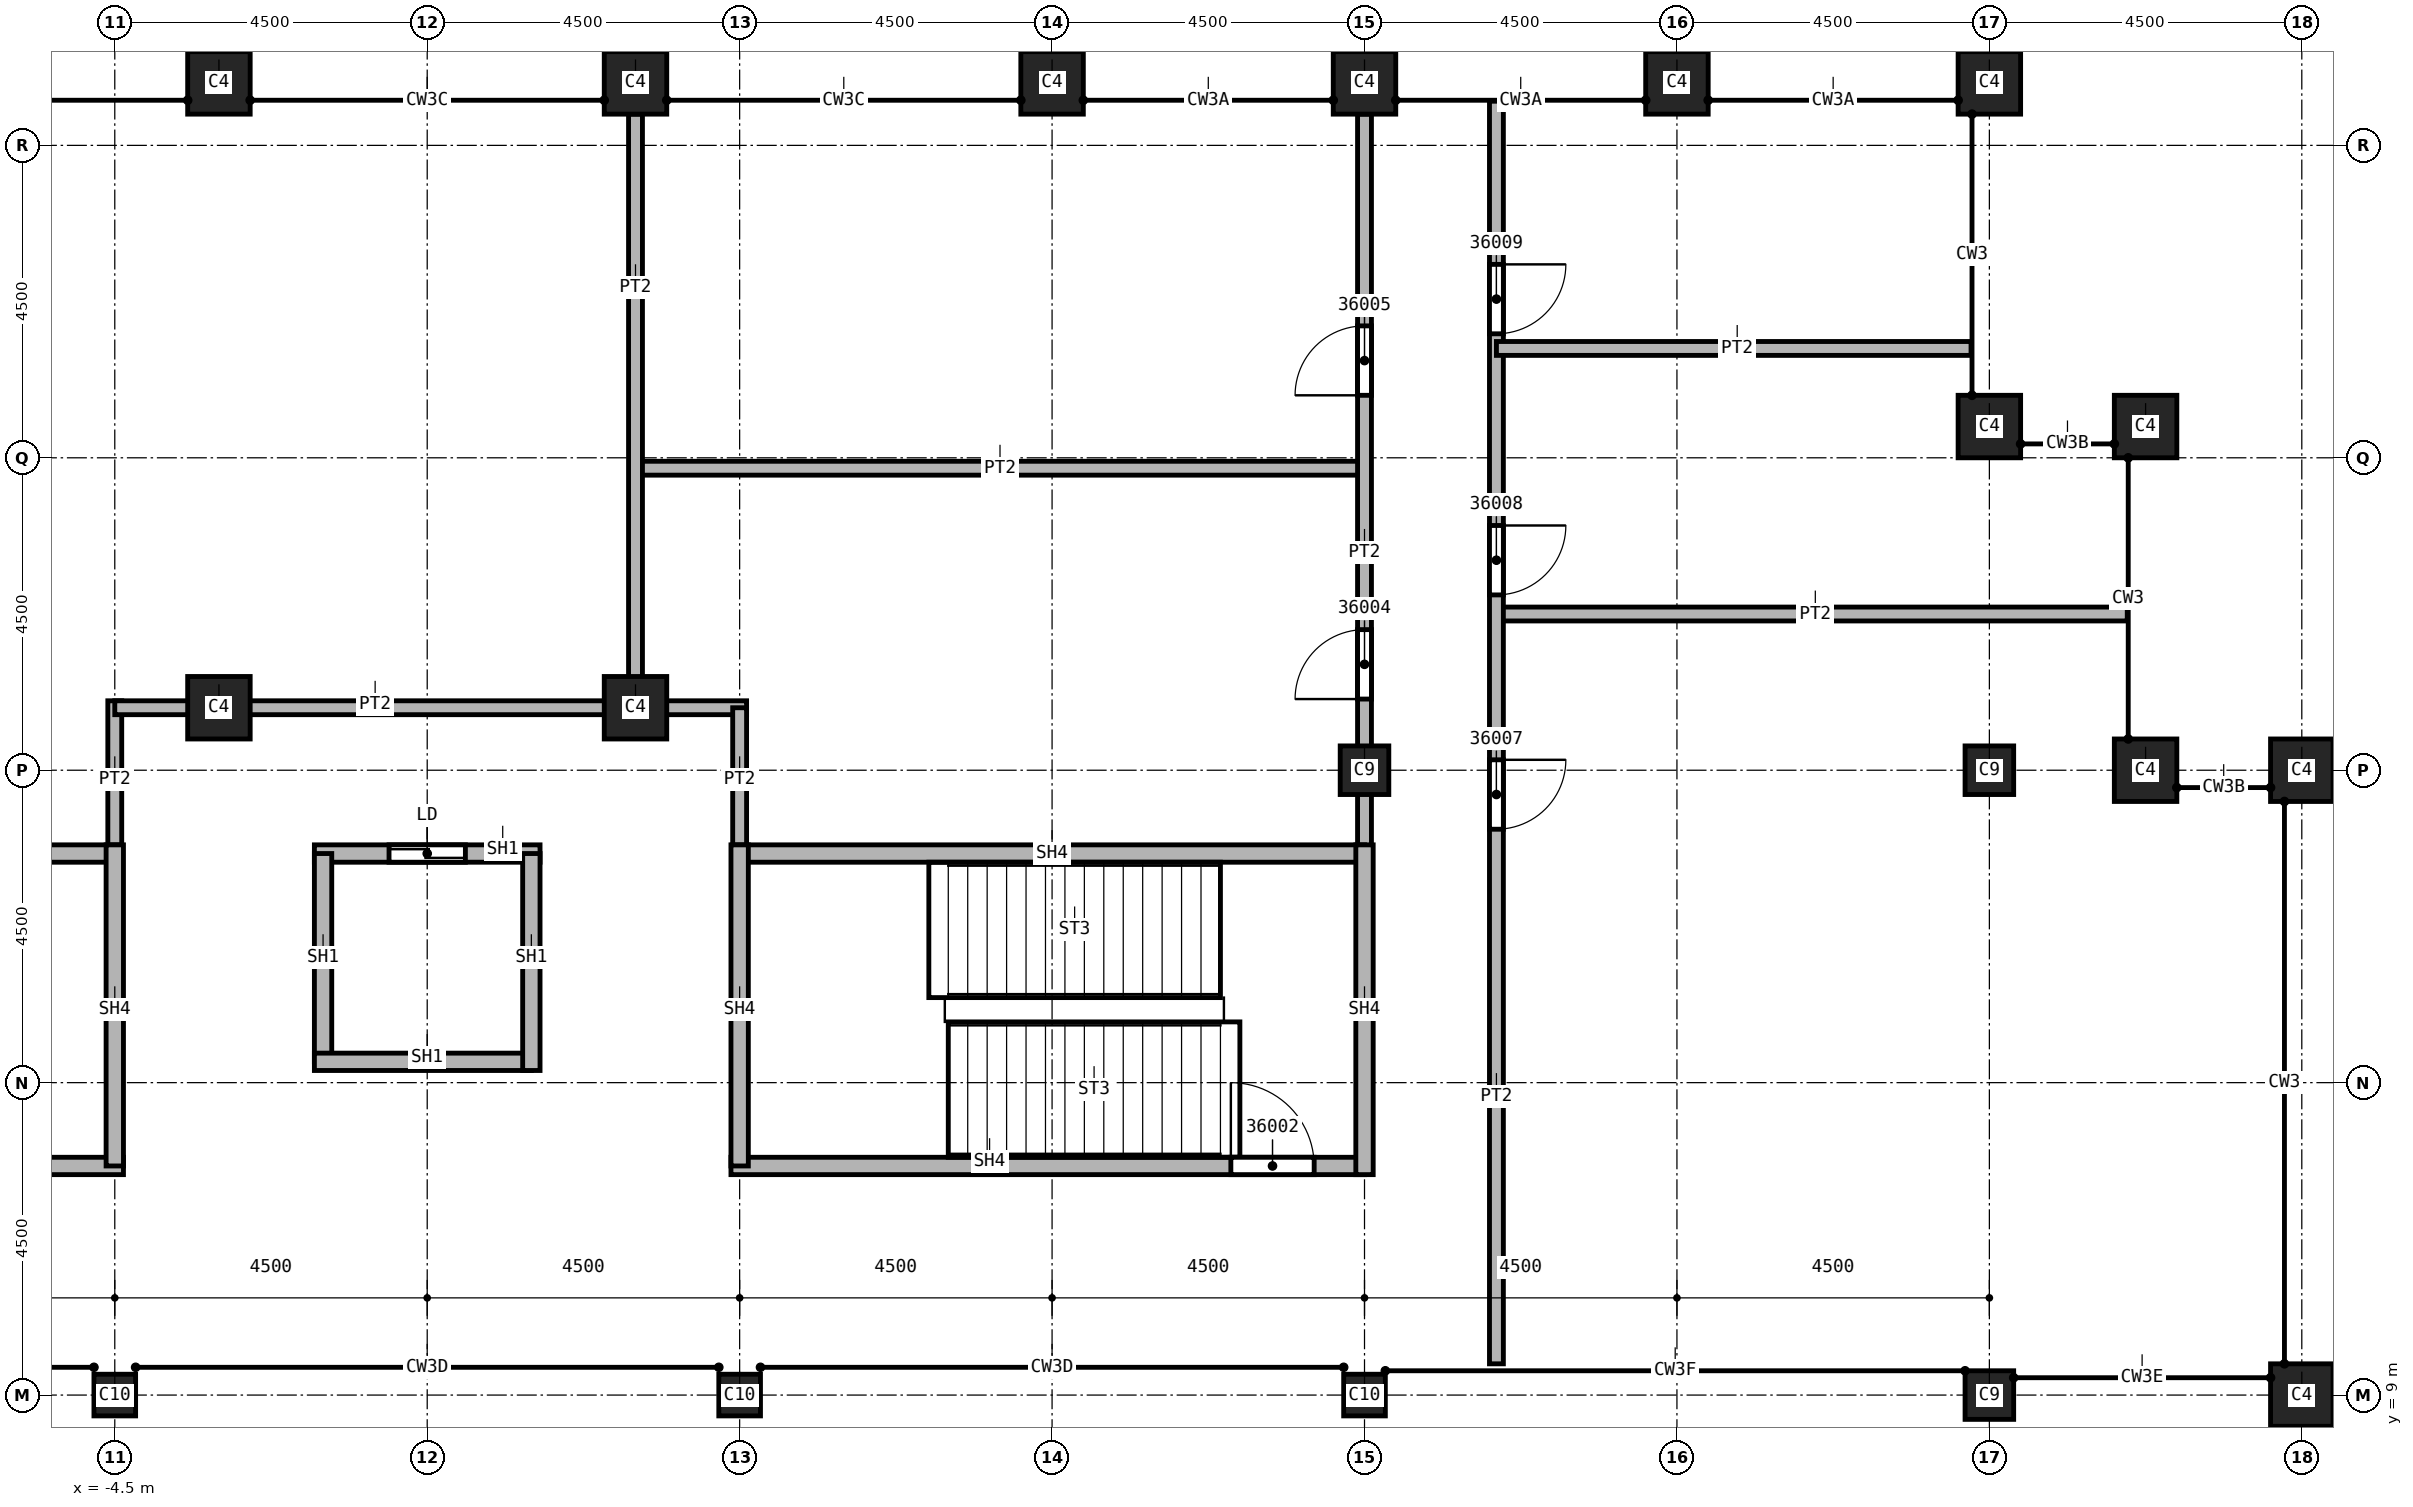
"""IFC4 building model, lengths in metres.
Left out: names, types, materials, properties, quantities, classifications, styles, units other than length and angle.
Written with IfcOpenShell. Run it as: python <this file> out.ifc"""

import sys

from ifc_helpers import new_model, si_unit, direction, frame, frame_2d, origin, origin_2d, place, context, subcontext, project, spatial, rectangle, extrude, element, fill, save


model = new_model("IFC4")
c1 = context("Model", 3, precision=1e-05, world=origin(), true_north=direction((0.0, 1.0)))
c2 = subcontext(c1, "Body", "Model", "MODEL_VIEW")
j1 = project(units=[si_unit("LENGTHUNIT", "METRE"), si_unit("PLANEANGLEUNIT", "RADIAN")], contexts=[c1])
p1 = place(None, origin())
s1 = spatial("IfcSite", under=j1, at=p1, CompositionType="ELEMENT")
p2 = place(p1, origin())
s2 = spatial("IfcBuilding", under=s1, at=p2, CompositionType="ELEMENT")
p3 = place(p2, frame((0.0, 0.0, 381.0)))
s3 = spatial("IfcBuildingStorey", under=s2, at=p3, CompositionType="ELEMENT", Elevation=381.0)
for number, where, z_axis, x_axis in (
    (1, (13.5, 18.0, 0.0), (0.0, 0.0, 1.0), (1.0, 0.0, 0.0)),
    (2, (22.5, 9.0, 0.0), (0.0, 0.0, 1.0), (1.0, 0.0, 0.0)),
    (3, (22.5, 18.0, 0.0), (0.0, 0.0, 1.0), (1.0, 0.0, 0.0)),
):
    element("IfcColumn", number, at=place(p3, frame(where, z_axis=z_axis, x_axis=x_axis)), inside=s3, PredefinedType="COLUMN", context=c2, shape_type="SweptSolid", body=[
        extrude(rectangle(XDim=0.7, YDim=0.7, at=origin_2d()), origin(), (0.0, 0.0, 1.0), 4.6),
    ])
for number, where, z_axis, x_axis in (
    (4, (4.5, 9.0, 0.0), (0.0, 0.0, 1.0), (1.0, 0.0, 0.0)),
    (5, (13.5, 9.0, 0.0), (0.0, 0.0, 1.0), (1.0, 0.0, 0.0)),
    (6, (-4.5, 9.0, 0.0), (0.0, 0.0, 1.0), (1.0, 0.0, 0.0)),
):
    element("IfcColumn", number, at=place(p3, frame(where, z_axis=z_axis, x_axis=x_axis)), inside=s3, PredefinedType="COLUMN", context=c2, shape_type="SweptSolid", body=[
        extrude(rectangle(XDim=0.6, YDim=0.6, at=origin_2d()), origin(), (0.0, 0.0, 1.0), 4.6),
    ])
for number, where, z_axis, x_axis in (
    (7, (27.0, 9.0, 0.0), (0.0, 0.0, 1.0), (0.0, 1.0, 0.0)),
    (8, (27.0, 18.0, 0.0), (0.0, 0.0, 1.0), (0.0, 1.0, 0.0)),
    (9, (3.0, 27.9, 0.0), (0.0, 0.0, 1.0), (1.0, 0.0, 0.0)),
    (10, (9.0, 27.9, 0.0), (0.0, 0.0, 1.0), (1.0, 0.0, 0.0)),
    (11, (13.5, 27.9, 0.0), (0.0, 0.0, 1.0), (1.0, 0.0, 0.0)),
    (12, (18.0, 27.9, 0.0), (0.0, 0.0, 1.0), (1.0, 0.0, 0.0)),
    (13, (22.5, 27.9, 0.0), (0.0, 0.0, 1.0), (1.0, 0.0, 0.0)),
    (14, (-3.0, 27.9, 0.0), (0.0, 0.0, 1.0), (1.0, 0.0, 0.0)),
    (15, (3.0, 18.9, 0.0), (0.0, 0.0, 1.0), (1.0, 0.0, 0.0)),
    (16, (-3.0, 18.9, 0.0), (0.0, 0.0, 1.0), (1.0, 0.0, 0.0)),
    (17, (22.5, 22.95, 0.0), (0.0, 0.0, 1.0), (1.0, 0.0, 0.0)),
    (18, (24.75, 22.95, 0.0), (0.0, 0.0, 1.0), (1.0, 0.0, 0.0)),
    (19, (24.75, 18.0, 0.0), (0.0, 0.0, 1.0), (1.0, 0.0, 0.0)),
):
    element("IfcColumn", number, at=place(p3, frame(where, z_axis=z_axis, x_axis=x_axis)), inside=s3, PredefinedType="COLUMN", context=c2, shape_type="SweptSolid", body=[
        extrude(rectangle(XDim=0.9, YDim=0.9, at=origin_2d()), origin(), (0.0, 0.0, 1.0), 4.6),
    ])
p4 = place(p3, frame((-4.5, 16.8, 0.0), z_axis=(0.0, 0.0, 1.0), x_axis=(0.0, 1.0, 0.0)))
e20 = element("IfcWall", 20, at=p4, inside=s3, PredefinedType="PARTITIONING", context=c2, shape_type="SweptSolid", body=[
    extrude(rectangle(XDim=2.2, YDim=0.2, at=frame_2d((1.1, 0.0))), origin(), (0.0, 0.0, 1.0), 4.15),
])
p5 = place(p3, frame((-4.5, 18.9, 0.0), z_axis=(0.0, 0.0, 1.0), x_axis=(1.0, 0.0, 0.0)))
e21 = element("IfcWall", 21, at=p5, inside=s3, PredefinedType="PARTITIONING", context=c2, shape_type="SweptSolid", body=[
    extrude(rectangle(XDim=9.1, YDim=0.2, at=frame_2d((4.55, 0.0))), origin(), (0.0, 0.0, 1.0), 4.15),
])
p6 = place(p3, frame((3.0, 22.35, 0.0), z_axis=(0.0, 0.0, 1.0), x_axis=(1.0, 0.0, 0.0)))
e22 = element("IfcWall", 22, at=p6, inside=s3, PredefinedType="PARTITIONING", context=c2, shape_type="SweptSolid", body=[
    extrude(rectangle(XDim=10.5, YDim=0.2, at=frame_2d((5.25, 0.0))), origin(), (0.0, 0.0, 1.0), 4.15),
])
p7 = place(p3, frame((3.0, 27.45, 0.0), z_axis=(0.0, 0.0, 1.0), x_axis=(0.0, -1.0, 0.0)))
e23 = element("IfcWall", 23, at=p7, inside=s3, PredefinedType="PARTITIONING", context=c2, shape_type="SweptSolid", body=[
    extrude(rectangle(XDim=8.55, YDim=0.2, at=frame_2d((4.275, 0.0))), origin(), (0.0, 0.0, 1.0), 4.15),
])
p8 = place(p3, frame((4.5, 18.9, 0.0), z_axis=(0.0, 0.0, 1.0), x_axis=(0.0, -1.0, 0.0)))
e24 = element("IfcWall", 24, at=p8, inside=s3, PredefinedType="PARTITIONING", context=c2, shape_type="SweptSolid", body=[
    extrude(rectangle(XDim=2.1, YDim=0.2, at=frame_2d((1.05, 0.0))), origin(), (0.0, 0.0, 1.0), 4.15),
])
p9 = place(p3, frame((13.5, 16.675, 0.0), z_axis=(0.0, 0.0, 1.0), x_axis=(0.0, 1.0, 0.0)))
e25 = element("IfcWall", 25, at=p9, inside=s3, PredefinedType="PARTITIONING", context=c2, shape_type="SweptSolid", body=[
    extrude(rectangle(XDim=10.775, YDim=0.2, at=frame_2d((5.387, 0.0))), origin(), (0.0, 0.0, 1.0), 4.15),
])
p10 = place(p9, frame((2.35, 0.0, 0.0)))
e26 = element("IfcOpeningElement", 26, at=p10, cuts=e25, PredefinedType="OPENING", context=c2, shape_type="SweptSolid", body=[
    extrude(rectangle(XDim=1.0, YDim=2.1, at=frame_2d((0.5, 1.05))), frame((0.0, 0.1, 0.0), z_axis=(0.0, -1.0, 0.0), x_axis=(1.0, 0.0, 0.0)), (0.0, 0.0, 1.0), 0.2),
])
p11 = place(p9, frame((6.725, 0.0, 0.0)))
e27 = element("IfcOpeningElement", 27, at=p11, cuts=e25, PredefinedType="OPENING", context=c2, shape_type="SweptSolid", body=[
    extrude(rectangle(XDim=1.0, YDim=2.1, at=frame_2d((0.5, 1.05))), frame((0.0, 0.1, 0.0), z_axis=(0.0, -1.0, 0.0), x_axis=(1.0, 0.0, 0.0)), (0.0, 0.0, 1.0), 0.2),
])
p12 = place(p3, frame((15.4, 20.25, 0.0), z_axis=(0.0, 0.0, 1.0), x_axis=(1.0, 0.0, 0.0)))
e28 = element("IfcWall", 28, at=p12, inside=s3, PredefinedType="PARTITIONING", context=c2, shape_type="SweptSolid", body=[
    extrude(rectangle(XDim=9.086, YDim=0.2, at=frame_2d((4.543, 0.0))), origin(), (0.0, 0.0, 1.0), 4.15),
])
p13 = place(p3, frame((15.4, 27.636, 0.0), z_axis=(0.0, 0.0, 1.0), x_axis=(0.0, -1.0, 0.0)))
e29 = element("IfcWall", 29, at=p13, inside=s3, PredefinedType="PARTITIONING", context=c2, shape_type="SweptSolid", body=[
    extrude(rectangle(XDim=18.186, YDim=0.2, at=frame_2d((9.093, 0.0))), origin(), (0.0, 0.0, 1.0), 4.15),
])
p14 = place(p13, frame((9.486, 0.0, 0.0)))
e30 = element("IfcOpeningElement", 30, at=p14, cuts=e29, PredefinedType="OPENING", context=c2, shape_type="SweptSolid", body=[
    extrude(rectangle(XDim=1.0, YDim=2.1, at=frame_2d((0.5, 1.05))), frame((0.0, 0.1, 0.0), z_axis=(0.0, -1.0, 0.0), x_axis=(1.0, 0.0, 0.0)), (0.0, 0.0, 1.0), 0.2),
])
p15 = place(p13, frame((6.111, 0.0, 0.0)))
e31 = element("IfcOpeningElement", 31, at=p15, cuts=e29, PredefinedType="OPENING", context=c2, shape_type="SweptSolid", body=[
    extrude(rectangle(XDim=1.0, YDim=2.1, at=frame_2d((0.5, 1.05))), frame((0.0, 0.1, 0.0), z_axis=(0.0, -1.0, 0.0), x_axis=(1.0, 0.0, 0.0)), (0.0, 0.0, 1.0), 0.2),
])
p16 = place(p13, frame((2.35, 0.0, 0.0)))
e32 = element("IfcOpeningElement", 32, at=p16, cuts=e29, PredefinedType="OPENING", context=c2, shape_type="SweptSolid", body=[
    extrude(rectangle(XDim=1.0, YDim=2.1, at=frame_2d((0.5, 1.05))), frame((0.0, 0.1, 0.0), z_axis=(0.0, -1.0, 0.0), x_axis=(1.0, 0.0, 0.0)), (0.0, 0.0, 1.0), 0.2),
])
p17 = place(p3, frame((15.4, 24.075, 0.0), z_axis=(0.0, 0.0, 1.0), x_axis=(1.0, 0.0, 0.0)))
e33 = element("IfcWall", 33, at=p17, inside=s3, PredefinedType="PARTITIONING", context=c2, shape_type="SweptSolid", body=[
    extrude(rectangle(XDim=6.836, YDim=0.2, at=frame_2d((3.418, 0.0))), origin(), (0.0, 0.0, 1.0), 4.15),
])
p18 = place(p3, frame((-1.625, 16.8, 0.0), z_axis=(0.0, 0.0, 1.0), x_axis=(1.0, 0.0, 0.0)))
e34 = element("IfcWall", 34, at=p18, inside=s3, PredefinedType="SOLIDWALL", context=c2, shape_type="SweptSolid", body=[
    extrude(rectangle(XDim=3.25, YDim=0.25, at=frame_2d((1.625, 0.0))), origin(), (0.0, 0.0, 1.0), 4.15),
])
p19 = place(p18, frame((1.075, 0.0, 0.0)))
e35 = element("IfcOpeningElement", 35, at=p19, cuts=e34, PredefinedType="OPENING", context=c2, shape_type="SweptSolid", body=[
    extrude(rectangle(XDim=1.1, YDim=2.1, at=frame_2d((0.55, 1.05))), frame((0.0, 0.125, 0.0), z_axis=(0.0, -1.0, 0.0), x_axis=(1.0, 0.0, 0.0)), (0.0, 0.0, 1.0), 0.25),
])
p20 = place(p3, frame((-1.5, 13.8, 0.0), z_axis=(0.0, 0.0, 1.0), x_axis=(0.0, 1.0, 0.0)))
e36 = element("IfcWall", 36, at=p20, inside=s3, PredefinedType="SOLIDWALL", context=c2, shape_type="SweptSolid", body=[
    extrude(rectangle(XDim=3.0, YDim=0.25, at=frame_2d((1.5, 0.0))), origin(), (0.0, 0.0, 1.0), 4.15),
])
for number, where, z_axis, x_axis in (
    (37, (1.5, 13.8, 0.0), (0.0, 0.0, 1.0), (-1.0, 0.0, 0.0)),
    (38, (1.5, 16.8, 0.0), (0.0, 0.0, 1.0), (0.0, -1.0, 0.0)),
):
    element("IfcWall", number, at=place(p3, frame(where, z_axis=z_axis, x_axis=x_axis)), inside=s3, PredefinedType="SOLIDWALL", context=c2, shape_type="SweptSolid", body=[
        extrude(rectangle(XDim=3.125, YDim=0.25, at=frame_2d((1.562, 0.0))), origin(), (0.0, 0.0, 1.0), 4.15),
    ])
p21 = place(p3, frame((-13.5, 12.3, 0.0), z_axis=(0.0, 0.0, 1.0), x_axis=(1.0, 0.0, 0.0)))
e39 = element("IfcWall", 39, at=p21, inside=s3, PredefinedType="SOLIDWALL", context=c2, shape_type="SweptSolid", body=[
    extrude(rectangle(XDim=9.125, YDim=0.25, at=frame_2d((4.562, 0.0))), origin(), (0.0, 0.0, 1.0), 4.15),
])
p22 = place(p21, frame((0.6, 0.0, 0.0)))
e40 = element("IfcOpeningElement", 40, at=p22, cuts=e39, PredefinedType="OPENING", context=c2, shape_type="SweptSolid", body=[
    extrude(rectangle(XDim=1.2, YDim=2.1, at=frame_2d((0.6, 1.05))), frame((0.0, 0.125, 0.0), z_axis=(0.0, -1.0, 0.0), x_axis=(1.0, 0.0, 0.0)), (0.0, 0.0, 1.0), 0.25),
])
p23 = place(p3, frame((-13.5, 16.8, 0.0), z_axis=(0.0, 0.0, 1.0), x_axis=(1.0, 0.0, 0.0)))
e41 = element("IfcWall", 41, at=p23, inside=s3, PredefinedType="SOLIDWALL", context=c2, shape_type="SweptSolid", body=[
    extrude(rectangle(XDim=9.1, YDim=0.25, at=frame_2d((4.55, 0.0))), origin(), (0.0, 0.0, 1.0), 4.15),
])
p24 = place(p3, frame((-4.5, 16.925, 0.0), z_axis=(0.0, 0.0, 1.0), x_axis=(0.0, -1.0, 0.0)))
e42 = element("IfcWall", 42, at=p24, inside=s3, PredefinedType="SOLIDWALL", context=c2, shape_type="SweptSolid", body=[
    extrude(rectangle(XDim=4.625, YDim=0.25, at=frame_2d((2.312, 0.0))), origin(), (0.0, 0.0, 1.0), 4.15),
])
p25 = place(p3, frame((4.375, 12.3, 0.0), z_axis=(0.0, 0.0, 1.0), x_axis=(1.0, 0.0, 0.0)))
e43 = element("IfcWall", 43, at=p25, inside=s3, PredefinedType="SOLIDWALL", context=c2, shape_type="SweptSolid", body=[
    extrude(rectangle(XDim=9.125, YDim=0.25, at=frame_2d((4.562, 0.0))), origin(), (0.0, 0.0, 1.0), 4.15),
])
p26 = place(p25, frame((7.2, 0.0, 0.0)))
e44 = element("IfcOpeningElement", 44, at=p26, cuts=e43, PredefinedType="OPENING", context=c2, shape_type="SweptSolid", body=[
    extrude(rectangle(XDim=1.2, YDim=2.1, at=frame_2d((0.6, 1.05))), frame((0.0, 0.125, 0.0), z_axis=(0.0, -1.0, 0.0), x_axis=(1.0, 0.0, 0.0)), (0.0, 0.0, 1.0), 0.25),
])
p27 = place(p3, frame((4.4, 16.8, 0.0), z_axis=(0.0, 0.0, 1.0), x_axis=(1.0, 0.0, 0.0)))
e45 = element("IfcWall", 45, at=p27, inside=s3, PredefinedType="SOLIDWALL", context=c2, shape_type="SweptSolid", body=[
    extrude(rectangle(XDim=9.1, YDim=0.25, at=frame_2d((4.55, 0.0))), origin(), (0.0, 0.0, 1.0), 4.15),
])
p28 = place(p3, frame((4.5, 12.3, 0.0), z_axis=(0.0, 0.0, 1.0), x_axis=(0.0, 1.0, 0.0)))
e46 = element("IfcWall", 46, at=p28, inside=s3, PredefinedType="SOLIDWALL", context=c2, shape_type="SweptSolid", body=[
    extrude(rectangle(XDim=4.625, YDim=0.25, at=frame_2d((2.312, 0.0))), origin(), (0.0, 0.0, 1.0), 4.15),
])
p29 = place(p3, frame((13.5, 12.175, 0.0), z_axis=(0.0, 0.0, 1.0), x_axis=(0.0, 1.0, 0.0)))
e47 = element("IfcWall", 47, at=p29, inside=s3, PredefinedType="SOLIDWALL", context=c2, shape_type="SweptSolid", body=[
    extrude(rectangle(XDim=4.75, YDim=0.25, at=frame_2d((2.375, 0.0))), origin(), (0.0, 0.0, 1.0), 4.15),
])
p30 = place(p26, origin())
e48 = element("IfcDoor", 48, at=p30, inside=s3, OperationType="SINGLE_SWING_LEFT", PredefinedType="DOOR", context=c2, shape_type="SweptSolid", body=[
    extrude(rectangle(XDim=1.2, YDim=2.1, at=frame_2d((0.6, 1.05))), frame((0.0, 0.025, 0.0), z_axis=(0.0, -1.0, 0.0), x_axis=(1.0, 0.0, 0.0)), (0.0, 0.0, 1.0), 0.05),
])
fill(e44, e48)
p31 = place(p10, origin())
e49 = element("IfcDoor", 49, at=p31, inside=s3, OperationType="SINGLE_SWING_LEFT", PredefinedType="DOOR", context=c2, shape_type="SweptSolid", body=[
    extrude(rectangle(XDim=1.0, YDim=2.1, at=frame_2d((0.5, 1.05))), frame((0.0, 0.025, 0.0), z_axis=(0.0, -1.0, 0.0), x_axis=(1.0, 0.0, 0.0)), (0.0, 0.0, 1.0), 0.05),
])
fill(e26, e49)
p32 = place(p11, origin())
e50 = element("IfcDoor", 50, at=p32, inside=s3, OperationType="SINGLE_SWING_RIGHT", PredefinedType="DOOR", context=c2, shape_type="SweptSolid", body=[
    extrude(rectangle(XDim=1.0, YDim=2.1, at=frame_2d((0.5, 1.05))), frame((0.0, 0.025, 0.0), z_axis=(0.0, -1.0, 0.0), x_axis=(1.0, 0.0, 0.0)), (0.0, 0.0, 1.0), 0.05),
])
fill(e27, e50)
p33 = place(p14, origin())
e51 = element("IfcDoor", 51, at=p33, inside=s3, OperationType="SINGLE_SWING_RIGHT", PredefinedType="DOOR", context=c2, shape_type="SweptSolid", body=[
    extrude(rectangle(XDim=1.0, YDim=2.1, at=frame_2d((0.5, 1.05))), frame((0.0, 0.025, 0.0), z_axis=(0.0, -1.0, 0.0), x_axis=(1.0, 0.0, 0.0)), (0.0, 0.0, 1.0), 0.05),
])
fill(e30, e51)
p34 = place(p15, origin())
e52 = element("IfcDoor", 52, at=p34, inside=s3, OperationType="SINGLE_SWING_LEFT", PredefinedType="DOOR", context=c2, shape_type="SweptSolid", body=[
    extrude(rectangle(XDim=1.0, YDim=2.1, at=frame_2d((0.5, 1.05))), frame((0.0, 0.025, 0.0), z_axis=(0.0, -1.0, 0.0), x_axis=(1.0, 0.0, 0.0)), (0.0, 0.0, 1.0), 0.05),
])
fill(e31, e52)
p35 = place(p16, origin())
e53 = element("IfcDoor", 53, at=p35, inside=s3, OperationType="SINGLE_SWING_RIGHT", PredefinedType="DOOR", context=c2, shape_type="SweptSolid", body=[
    extrude(rectangle(XDim=1.0, YDim=2.1, at=frame_2d((0.5, 1.05))), frame((0.0, 0.025, 0.0), z_axis=(0.0, -1.0, 0.0), x_axis=(1.0, 0.0, 0.0)), (0.0, 0.0, 1.0), 0.05),
])
fill(e32, e53)
p36 = place(p19, origin())
e54 = element("IfcDoor", 54, at=p36, inside=s3, OperationType="SLIDING_TO_LEFT", PredefinedType="DOOR", context=c2, shape_type="SweptSolid", body=[
    extrude(rectangle(XDim=1.1, YDim=2.1, at=frame_2d((0.55, 1.05))), frame((0.0, 0.025, 0.0), z_axis=(0.0, -1.0, 0.0), x_axis=(1.0, 0.0, 0.0)), (0.0, 0.0, 1.0), 0.05),
])
fill(e35, e54)
save(model, sys.argv[1])
